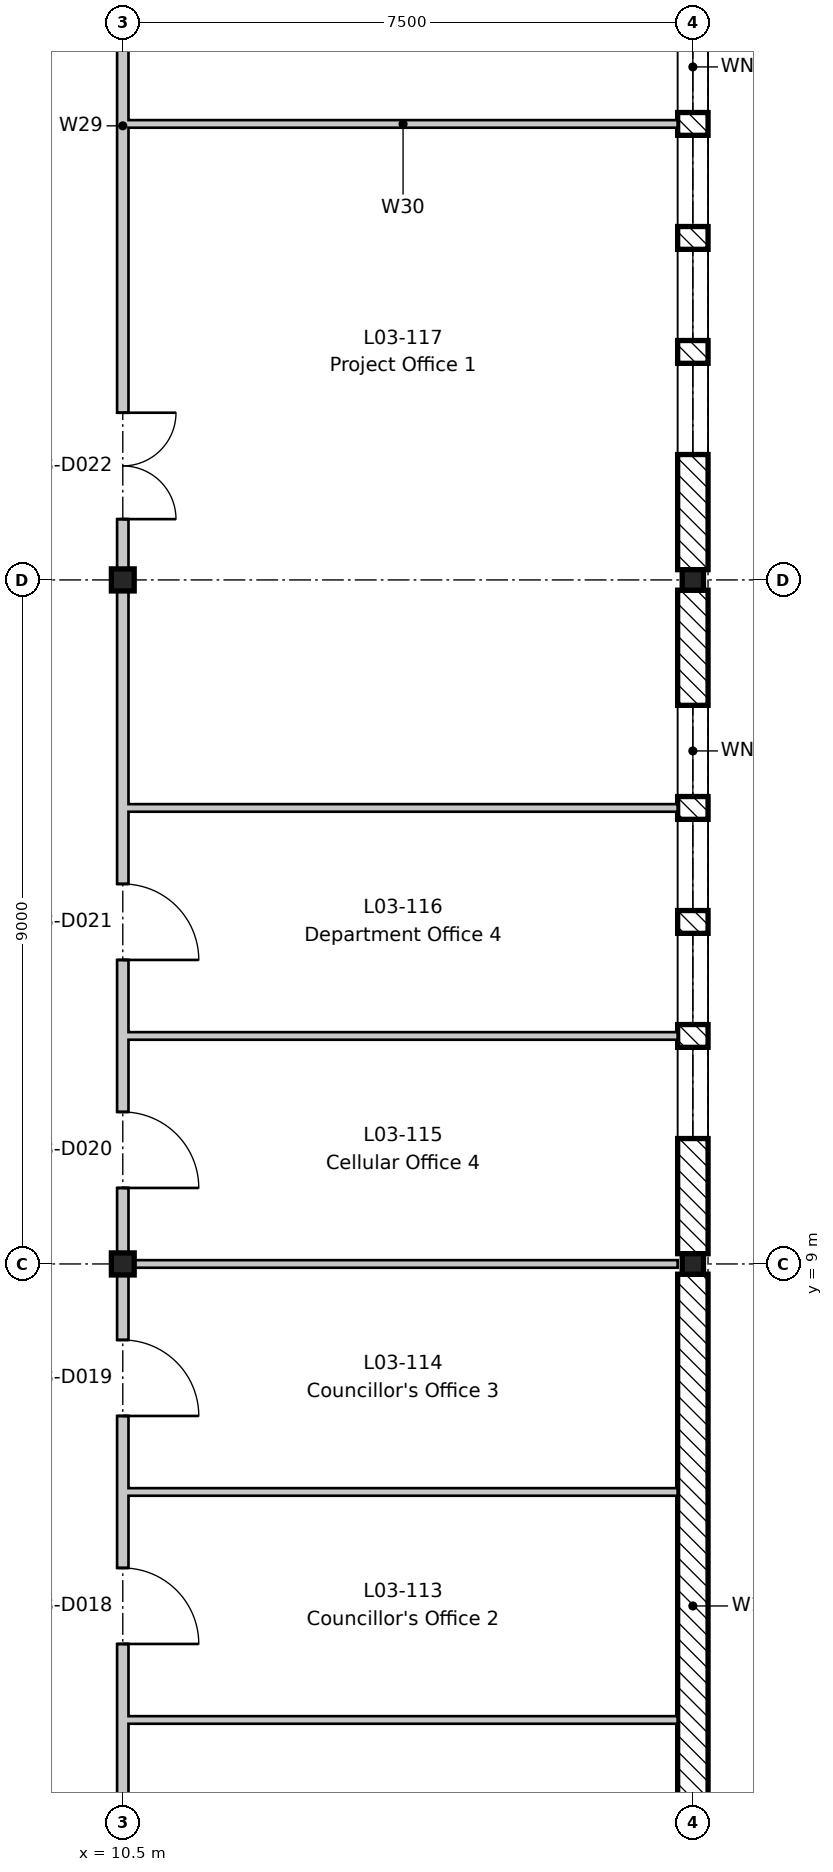
"""IFC4 building model, lengths in metres.
Left out: names, types, materials, properties, quantities, classifications, styles, units other than length and angle.
Written with IfcOpenShell. Run it as: python <this file> out.ifc"""

import sys

from ifc_helpers import new_model, si_unit, direction, frame, frame_2d, origin, origin_2d, place, context, subcontext, project, spatial, rectangle, i_section, extrude, element, fill, save


model = new_model("IFC4")
c1 = context("Model", 3, precision=1e-05, world=origin(), true_north=direction((0.0, 1.0)))
c2 = subcontext(c1, "Body", "Model", "MODEL_VIEW")
j1 = project(units=[si_unit("LENGTHUNIT", "METRE"), si_unit("PLANEANGLEUNIT", "RADIAN")], contexts=[c1])
p1 = place(None, origin())
s1 = spatial("IfcSite", under=j1, at=p1, CompositionType="ELEMENT")
p2 = place(p1, origin())
s2 = spatial("IfcBuilding", under=s1, at=p2, CompositionType="ELEMENT")
p3 = place(p2, frame((0.0, 0.0, 14.4)))
s3 = spatial("IfcBuildingStorey", under=s2, at=p3, CompositionType="ELEMENT", Elevation=14.4)
for number, where, z_axis, x_axis in (
    (1, (10.5, 9.0, -0.2), (0.0, 0.0, 1.0), (1.0, 0.0, 0.0)),
    (2, (10.5, 18.0, -0.2), (0.0, 0.0, 1.0), (1.0, 0.0, 0.0)),
):
    element("IfcColumn", number, at=place(p3, frame(where, z_axis=z_axis, x_axis=x_axis)), inside=s3, PredefinedType="COLUMN", context=c2, shape_type="SweptSolid", body=[
        extrude(i_section(OverallWidth=0.3, OverallDepth=0.29, WebThickness=0.009, FlangeThickness=0.014, FilletRadius=0.027, at=origin_2d()), origin(), (0.0, 0.0, 1.0), 4.2),
    ])
for number, where, z_axis, x_axis in (
    (3, (18.0, 9.0, -0.2), (0.0, 0.0, 1.0), (1.0, 0.0, 0.0)),
    (4, (18.0, 18.0, -0.2), (0.0, 0.0, 1.0), (1.0, 0.0, 0.0)),
):
    element("IfcColumn", number, at=place(p3, frame(where, z_axis=z_axis, x_axis=x_axis)), inside=s3, PredefinedType="COLUMN", context=c2, shape_type="SweptSolid", body=[
        extrude(i_section(OverallWidth=0.28, OverallDepth=0.27, WebThickness=0.008, FlangeThickness=0.013, FilletRadius=0.024, at=origin_2d()), origin(), (0.0, 0.0, 1.0), 4.2),
    ])
p4 = place(p3, frame((18.0, 8.865, 0.0), z_axis=(0.0, 0.0, 1.0), x_axis=(0.0, -1.0, 0.0)))
e5 = element("IfcWall", 5, at=p4, inside=s3, PredefinedType="STANDARD", context=c2, shape_type="SweptSolid", body=[
    extrude(rectangle(XDim=8.73, YDim=0.4, at=frame_2d((4.365, 0.0))), origin(), (0.0, 0.0, 1.0), 3.6),
])
p5 = place(p3, frame((18.0, 17.865, 0.0), z_axis=(0.0, 0.0, 1.0), x_axis=(0.0, -1.0, 0.0)))
e6 = element("IfcWall", 6, at=p5, inside=s3, PredefinedType="STANDARD", context=c2, shape_type="SweptSolid", body=[
    extrude(rectangle(XDim=8.73, YDim=0.4, at=frame_2d((4.365, 0.0))), origin(), (0.0, 0.0, 1.0), 3.6),
])
p6 = place(p5, frame((6.015, 0.0, 0.6)))
e7 = element("IfcOpeningElement", 7, at=p6, cuts=e6, PredefinedType="OPENING", context=c2, shape_type="SweptSolid", body=[
    extrude(rectangle(XDim=1.2, YDim=2.7, at=frame_2d((0.6, 1.35))), frame((0.0, 0.21, 0.0), z_axis=(0.0, -1.0, 0.0), x_axis=(1.0, 0.0, 0.0)), (0.0, 0.0, 1.0), 0.42),
])
p7 = place(p5, frame((4.515, 0.0, 0.6)))
e8 = element("IfcOpeningElement", 8, at=p7, cuts=e6, PredefinedType="OPENING", context=c2, shape_type="SweptSolid", body=[
    extrude(rectangle(XDim=1.2, YDim=2.7, at=frame_2d((0.6, 1.35))), frame((0.0, 0.21, 0.0), z_axis=(0.0, -1.0, 0.0), x_axis=(1.0, 0.0, 0.0)), (0.0, 0.0, 1.0), 0.42),
])
p8 = place(p5, frame((3.015, 0.0, 0.6)))
e9 = element("IfcOpeningElement", 9, at=p8, cuts=e6, PredefinedType="OPENING", context=c2, shape_type="SweptSolid", body=[
    extrude(rectangle(XDim=1.2, YDim=2.7, at=frame_2d((0.6, 1.35))), frame((0.0, 0.21, 0.0), z_axis=(0.0, -1.0, 0.0), x_axis=(1.0, 0.0, 0.0)), (0.0, 0.0, 1.0), 0.42),
])
p9 = place(p5, frame((1.515, 0.0, 0.6)))
e10 = element("IfcOpeningElement", 10, at=p9, cuts=e6, PredefinedType="OPENING", context=c2, shape_type="SweptSolid", body=[
    extrude(rectangle(XDim=1.2, YDim=2.7, at=frame_2d((0.6, 1.35))), frame((0.0, 0.21, 0.0), z_axis=(0.0, -1.0, 0.0), x_axis=(1.0, 0.0, 0.0)), (0.0, 0.0, 1.0), 0.42),
])
p10 = place(p3, frame((18.0, 26.865, 0.0), z_axis=(0.0, 0.0, 1.0), x_axis=(0.0, -1.0, 0.0)))
e11 = element("IfcWall", 11, at=p10, inside=s3, PredefinedType="STANDARD", context=c2, shape_type="SweptSolid", body=[
    extrude(rectangle(XDim=8.73, YDim=0.4, at=frame_2d((4.365, 0.0))), origin(), (0.0, 0.0, 1.0), 3.6),
])
p11 = place(p10, frame((6.015, 0.0, 0.6)))
e12 = element("IfcOpeningElement", 12, at=p11, cuts=e11, PredefinedType="OPENING", context=c2, shape_type="SweptSolid", body=[
    extrude(rectangle(XDim=1.2, YDim=2.7, at=frame_2d((0.6, 1.35))), frame((0.0, 0.21, 0.0), z_axis=(0.0, -1.0, 0.0), x_axis=(1.0, 0.0, 0.0)), (0.0, 0.0, 1.0), 0.42),
])
p12 = place(p10, frame((4.515, 0.0, 0.6)))
e13 = element("IfcOpeningElement", 13, at=p12, cuts=e11, PredefinedType="OPENING", context=c2, shape_type="SweptSolid", body=[
    extrude(rectangle(XDim=1.2, YDim=2.7, at=frame_2d((0.6, 1.35))), frame((0.0, 0.21, 0.0), z_axis=(0.0, -1.0, 0.0), x_axis=(1.0, 0.0, 0.0)), (0.0, 0.0, 1.0), 0.42),
])
p13 = place(p10, frame((3.015, 0.0, 0.6)))
e14 = element("IfcOpeningElement", 14, at=p13, cuts=e11, PredefinedType="OPENING", context=c2, shape_type="SweptSolid", body=[
    extrude(rectangle(XDim=1.2, YDim=2.7, at=frame_2d((0.6, 1.35))), frame((0.0, 0.21, 0.0), z_axis=(0.0, -1.0, 0.0), x_axis=(1.0, 0.0, 0.0)), (0.0, 0.0, 1.0), 0.42),
])
p14 = place(p10, frame((1.515, 0.0, 0.6)))
e15 = element("IfcOpeningElement", 15, at=p14, cuts=e11, PredefinedType="OPENING", context=c2, shape_type="SweptSolid", body=[
    extrude(rectangle(XDim=1.2, YDim=2.7, at=frame_2d((0.6, 1.35))), frame((0.0, 0.21, 0.0), z_axis=(0.0, -1.0, 0.0), x_axis=(1.0, 0.0, 0.0)), (0.0, 0.0, 1.0), 0.42),
])
for number, where, z_axis, x_axis in (
    (16, (10.575, 3.0, 0.0), (0.0, 0.0, 1.0), (1.0, 0.0, 0.0)),
    (17, (10.575, 6.0, 0.0), (0.0, 0.0, 1.0), (1.0, 0.0, 0.0)),
):
    element("IfcWall", number, at=place(p3, frame(where, z_axis=z_axis, x_axis=x_axis)), inside=s3, PredefinedType="PARTITIONING", context=c2, shape_type="SweptSolid", body=[
        extrude(rectangle(XDim=7.225, YDim=0.1, at=frame_2d((3.613, 0.0))), origin(), (0.0, 0.0, 1.0), 4.0),
    ])
p15 = place(p3, frame((10.575, 9.0, 0.0), z_axis=(0.0, 0.0, 1.0), x_axis=(1.0, 0.0, 0.0)))
e18 = element("IfcWall", 18, at=p15, inside=s3, PredefinedType="PARTITIONING", context=c2, shape_type="SweptSolid", body=[
    extrude(rectangle(XDim=7.225, YDim=0.1, at=frame_2d((3.613, 0.0))), origin(), (0.0, 0.0, 1.0), 3.65),
])
for number, where, z_axis, x_axis in (
    (19, (10.575, 12.0, 0.0), (0.0, 0.0, 1.0), (1.0, 0.0, 0.0)),
    (20, (10.575, 15.0, 0.0), (0.0, 0.0, 1.0), (1.0, 0.0, 0.0)),
    (21, (10.575, 24.0, 0.0), (0.0, 0.0, 1.0), (1.0, 0.0, 0.0)),
):
    element("IfcWall", number, at=place(p3, frame(where, z_axis=z_axis, x_axis=x_axis)), inside=s3, PredefinedType="PARTITIONING", context=c2, shape_type="SweptSolid", body=[
        extrude(rectangle(XDim=7.225, YDim=0.1, at=frame_2d((3.613, 0.0))), origin(), (0.0, 0.0, 1.0), 4.0),
    ])
p16 = place(p3, frame((10.5, -8.8, 0.0), z_axis=(0.0, 0.0, 1.0), x_axis=(0.0, 1.0, 0.0)))
e22 = element("IfcWall", 22, at=p16, inside=s3, PredefinedType="PARTITIONING", context=c2, shape_type="SweptSolid", body=[
    extrude(rectangle(XDim=79.3, YDim=0.15, at=frame_2d((39.65, 0.0))), origin(), (0.0, 0.0, 1.0), 3.48),
])
p17 = place(p16, frame((3.6, 0.0, 0.0)))
e23 = element("IfcOpeningElement", 23, at=p17, cuts=e22, PredefinedType="OPENING", context=c2, shape_type="SweptSolid", body=[
    extrude(rectangle(XDim=1.4, YDim=2.1, at=frame_2d((0.7, 1.05))), frame((0.0, 0.085, 0.0), z_axis=(0.0, -1.0, 0.0), x_axis=(1.0, 0.0, 0.0)), (0.0, 0.0, 1.0), 0.17),
])
p18 = place(p16, frame((9.8, 0.0, 0.0)))
e24 = element("IfcOpeningElement", 24, at=p18, cuts=e22, PredefinedType="OPENING", context=c2, shape_type="SweptSolid", body=[
    extrude(rectangle(XDim=1.0, YDim=2.1, at=frame_2d((0.5, 1.05))), frame((0.0, 0.085, 0.0), z_axis=(0.0, -1.0, 0.0), x_axis=(1.0, 0.0, 0.0)), (0.0, 0.0, 1.0), 0.17),
])
p19 = place(p16, frame((12.8, 0.0, 0.0)))
e25 = element("IfcOpeningElement", 25, at=p19, cuts=e22, PredefinedType="OPENING", context=c2, shape_type="SweptSolid", body=[
    extrude(rectangle(XDim=1.0, YDim=2.1, at=frame_2d((0.5, 1.05))), frame((0.0, 0.085, 0.0), z_axis=(0.0, -1.0, 0.0), x_axis=(1.0, 0.0, 0.0)), (0.0, 0.0, 1.0), 0.17),
])
p20 = place(p16, frame((15.8, 0.0, 0.0)))
e26 = element("IfcOpeningElement", 26, at=p20, cuts=e22, PredefinedType="OPENING", context=c2, shape_type="SweptSolid", body=[
    extrude(rectangle(XDim=1.0, YDim=2.1, at=frame_2d((0.5, 1.05))), frame((0.0, 0.085, 0.0), z_axis=(0.0, -1.0, 0.0), x_axis=(1.0, 0.0, 0.0)), (0.0, 0.0, 1.0), 0.17),
])
p21 = place(p16, frame((18.8, 0.0, 0.0)))
e27 = element("IfcOpeningElement", 27, at=p21, cuts=e22, PredefinedType="OPENING", context=c2, shape_type="SweptSolid", body=[
    extrude(rectangle(XDim=1.0, YDim=2.1, at=frame_2d((0.5, 1.05))), frame((0.0, 0.085, 0.0), z_axis=(0.0, -1.0, 0.0), x_axis=(1.0, 0.0, 0.0)), (0.0, 0.0, 1.0), 0.17),
])
p22 = place(p16, frame((21.8, 0.0, 0.0)))
e28 = element("IfcOpeningElement", 28, at=p22, cuts=e22, PredefinedType="OPENING", context=c2, shape_type="SweptSolid", body=[
    extrude(rectangle(XDim=1.0, YDim=2.1, at=frame_2d((0.5, 1.05))), frame((0.0, 0.085, 0.0), z_axis=(0.0, -1.0, 0.0), x_axis=(1.0, 0.0, 0.0)), (0.0, 0.0, 1.0), 0.17),
])
p23 = place(p16, frame((27.6, 0.0, 0.0)))
e29 = element("IfcOpeningElement", 29, at=p23, cuts=e22, PredefinedType="OPENING", context=c2, shape_type="SweptSolid", body=[
    extrude(rectangle(XDim=1.4, YDim=2.1, at=frame_2d((0.7, 1.05))), frame((0.0, 0.085, 0.0), z_axis=(0.0, -1.0, 0.0), x_axis=(1.0, 0.0, 0.0)), (0.0, 0.0, 1.0), 0.17),
])
p24 = place(p16, frame((36.55, 0.0, 0.0)))
e30 = element("IfcOpeningElement", 30, at=p24, cuts=e22, PredefinedType="OPENING", context=c2, shape_type="SweptSolid", body=[
    extrude(rectangle(XDim=1.0, YDim=2.1, at=frame_2d((0.5, 1.05))), frame((0.0, 0.085, 0.0), z_axis=(0.0, -1.0, 0.0), x_axis=(1.0, 0.0, 0.0)), (0.0, 0.0, 1.0), 0.17),
])
p25 = place(p16, frame((39.8, 0.0, 0.0)))
e31 = element("IfcOpeningElement", 31, at=p25, cuts=e22, PredefinedType="OPENING", context=c2, shape_type="SweptSolid", body=[
    extrude(rectangle(XDim=1.0, YDim=2.1, at=frame_2d((0.5, 1.05))), frame((0.0, 0.085, 0.0), z_axis=(0.0, -1.0, 0.0), x_axis=(1.0, 0.0, 0.0)), (0.0, 0.0, 1.0), 0.17),
])
p26 = place(p16, frame((42.8, 0.0, 0.0)))
e32 = element("IfcOpeningElement", 32, at=p26, cuts=e22, PredefinedType="OPENING", context=c2, shape_type="SweptSolid", body=[
    extrude(rectangle(XDim=1.0, YDim=2.1, at=frame_2d((0.5, 1.05))), frame((0.0, 0.085, 0.0), z_axis=(0.0, -1.0, 0.0), x_axis=(1.0, 0.0, 0.0)), (0.0, 0.0, 1.0), 0.17),
])
p27 = place(p16, frame((47.3, 0.0, 0.0)))
e33 = element("IfcOpeningElement", 33, at=p27, cuts=e22, PredefinedType="OPENING", context=c2, shape_type="SweptSolid", body=[
    extrude(rectangle(XDim=1.0, YDim=2.1, at=frame_2d((0.5, 1.05))), frame((0.0, 0.085, 0.0), z_axis=(0.0, -1.0, 0.0), x_axis=(1.0, 0.0, 0.0)), (0.0, 0.0, 1.0), 0.17),
])
p28 = place(p16, frame((51.8, 0.0, 0.0)))
e34 = element("IfcOpeningElement", 34, at=p28, cuts=e22, PredefinedType="OPENING", context=c2, shape_type="SweptSolid", body=[
    extrude(rectangle(XDim=1.0, YDim=2.1, at=frame_2d((0.5, 1.05))), frame((0.0, 0.085, 0.0), z_axis=(0.0, -1.0, 0.0), x_axis=(1.0, 0.0, 0.0)), (0.0, 0.0, 1.0), 0.17),
])
p29 = place(p16, frame((56.3, 0.0, 0.0)))
e35 = element("IfcOpeningElement", 35, at=p29, cuts=e22, PredefinedType="OPENING", context=c2, shape_type="SweptSolid", body=[
    extrude(rectangle(XDim=1.0, YDim=2.1, at=frame_2d((0.5, 1.05))), frame((0.0, 0.085, 0.0), z_axis=(0.0, -1.0, 0.0), x_axis=(1.0, 0.0, 0.0)), (0.0, 0.0, 1.0), 0.17),
])
p30 = place(p16, frame((60.8, 0.0, 0.0)))
e36 = element("IfcOpeningElement", 36, at=p30, cuts=e22, PredefinedType="OPENING", context=c2, shape_type="SweptSolid", body=[
    extrude(rectangle(XDim=1.0, YDim=2.1, at=frame_2d((0.5, 1.05))), frame((0.0, 0.085, 0.0), z_axis=(0.0, -1.0, 0.0), x_axis=(1.0, 0.0, 0.0)), (0.0, 0.0, 1.0), 0.17),
])
p31 = place(p16, frame((63.8, 0.0, 0.0)))
e37 = element("IfcOpeningElement", 37, at=p31, cuts=e22, PredefinedType="OPENING", context=c2, shape_type="SweptSolid", body=[
    extrude(rectangle(XDim=1.0, YDim=2.1, at=frame_2d((0.5, 1.05))), frame((0.0, 0.085, 0.0), z_axis=(0.0, -1.0, 0.0), x_axis=(1.0, 0.0, 0.0)), (0.0, 0.0, 1.0), 0.17),
])
p32 = place(p16, frame((66.8, 0.0, 0.0)))
e38 = element("IfcOpeningElement", 38, at=p32, cuts=e22, PredefinedType="OPENING", context=c2, shape_type="SweptSolid", body=[
    extrude(rectangle(XDim=1.0, YDim=2.1, at=frame_2d((0.5, 1.05))), frame((0.0, 0.085, 0.0), z_axis=(0.0, -1.0, 0.0), x_axis=(1.0, 0.0, 0.0)), (0.0, 0.0, 1.0), 0.17),
])
p33 = place(p16, frame((69.8, 0.0, 0.0)))
e39 = element("IfcOpeningElement", 39, at=p33, cuts=e22, PredefinedType="OPENING", context=c2, shape_type="SweptSolid", body=[
    extrude(rectangle(XDim=1.0, YDim=2.1, at=frame_2d((0.5, 1.05))), frame((0.0, 0.085, 0.0), z_axis=(0.0, -1.0, 0.0), x_axis=(1.0, 0.0, 0.0)), (0.0, 0.0, 1.0), 0.17),
])
p34 = place(p16, frame((72.8, 0.0, 0.0)))
e40 = element("IfcOpeningElement", 40, at=p34, cuts=e22, PredefinedType="OPENING", context=c2, shape_type="SweptSolid", body=[
    extrude(rectangle(XDim=1.0, YDim=2.1, at=frame_2d((0.5, 1.05))), frame((0.0, 0.085, 0.0), z_axis=(0.0, -1.0, 0.0), x_axis=(1.0, 0.0, 0.0)), (0.0, 0.0, 1.0), 0.17),
])
p35 = place(p6, origin())
e41 = element("IfcWindow", 41, at=p35, inside=s3, PartitioningType="SINGLE_PANEL", PredefinedType="WINDOW", context=c2, shape_type="SweptSolid", body=[
    extrude(rectangle(XDim=1.2, YDim=2.7, at=frame_2d((0.6, 1.35))), frame((0.0, 0.03, 0.0), z_axis=(0.0, -1.0, 0.0), x_axis=(1.0, 0.0, 0.0)), (0.0, 0.0, 1.0), 0.06),
])
fill(e7, e41)
p36 = place(p7, origin())
e42 = element("IfcWindow", 42, at=p36, inside=s3, PartitioningType="SINGLE_PANEL", PredefinedType="WINDOW", context=c2, shape_type="SweptSolid", body=[
    extrude(rectangle(XDim=1.2, YDim=2.7, at=frame_2d((0.6, 1.35))), frame((0.0, 0.03, 0.0), z_axis=(0.0, -1.0, 0.0), x_axis=(1.0, 0.0, 0.0)), (0.0, 0.0, 1.0), 0.06),
])
fill(e8, e42)
p37 = place(p8, origin())
e43 = element("IfcWindow", 43, at=p37, inside=s3, PartitioningType="SINGLE_PANEL", PredefinedType="WINDOW", context=c2, shape_type="SweptSolid", body=[
    extrude(rectangle(XDim=1.2, YDim=2.7, at=frame_2d((0.6, 1.35))), frame((0.0, 0.03, 0.0), z_axis=(0.0, -1.0, 0.0), x_axis=(1.0, 0.0, 0.0)), (0.0, 0.0, 1.0), 0.06),
])
fill(e9, e43)
p38 = place(p9, origin())
e44 = element("IfcWindow", 44, at=p38, inside=s3, PartitioningType="SINGLE_PANEL", PredefinedType="WINDOW", context=c2, shape_type="SweptSolid", body=[
    extrude(rectangle(XDim=1.2, YDim=2.7, at=frame_2d((0.6, 1.35))), frame((0.0, 0.03, 0.0), z_axis=(0.0, -1.0, 0.0), x_axis=(1.0, 0.0, 0.0)), (0.0, 0.0, 1.0), 0.06),
])
fill(e10, e44)
p39 = place(p11, origin())
e45 = element("IfcWindow", 45, at=p39, inside=s3, PartitioningType="SINGLE_PANEL", PredefinedType="WINDOW", context=c2, shape_type="SweptSolid", body=[
    extrude(rectangle(XDim=1.2, YDim=2.7, at=frame_2d((0.6, 1.35))), frame((0.0, 0.03, 0.0), z_axis=(0.0, -1.0, 0.0), x_axis=(1.0, 0.0, 0.0)), (0.0, 0.0, 1.0), 0.06),
])
fill(e12, e45)
p40 = place(p12, origin())
e46 = element("IfcWindow", 46, at=p40, inside=s3, PartitioningType="SINGLE_PANEL", PredefinedType="WINDOW", context=c2, shape_type="SweptSolid", body=[
    extrude(rectangle(XDim=1.2, YDim=2.7, at=frame_2d((0.6, 1.35))), frame((0.0, 0.03, 0.0), z_axis=(0.0, -1.0, 0.0), x_axis=(1.0, 0.0, 0.0)), (0.0, 0.0, 1.0), 0.06),
])
fill(e13, e46)
p41 = place(p13, origin())
e47 = element("IfcWindow", 47, at=p41, inside=s3, PartitioningType="SINGLE_PANEL", PredefinedType="WINDOW", context=c2, shape_type="SweptSolid", body=[
    extrude(rectangle(XDim=1.2, YDim=2.7, at=frame_2d((0.6, 1.35))), frame((0.0, 0.03, 0.0), z_axis=(0.0, -1.0, 0.0), x_axis=(1.0, 0.0, 0.0)), (0.0, 0.0, 1.0), 0.06),
])
fill(e14, e47)
p42 = place(p14, origin())
e48 = element("IfcWindow", 48, at=p42, inside=s3, PartitioningType="SINGLE_PANEL", PredefinedType="WINDOW", context=c2, shape_type="SweptSolid", body=[
    extrude(rectangle(XDim=1.2, YDim=2.7, at=frame_2d((0.6, 1.35))), frame((0.0, 0.03, 0.0), z_axis=(0.0, -1.0, 0.0), x_axis=(1.0, 0.0, 0.0)), (0.0, 0.0, 1.0), 0.06),
])
fill(e15, e48)
p43 = place(p19, frame((1.0, 0.0, 0.0), z_axis=(0.0, 0.0, 1.0), x_axis=(-1.0, 0.0, 0.0)))
e49 = element("IfcDoor", 49, at=p43, inside=s3, OperationType="SINGLE_SWING_RIGHT", PredefinedType="DOOR", context=c2, shape_type="SweptSolid", body=[
    extrude(rectangle(XDim=1.0, YDim=2.1, at=frame_2d((0.5, 1.05))), frame((0.0, 0.025, 0.0), z_axis=(0.0, -1.0, 0.0), x_axis=(1.0, 0.0, 0.0)), (0.0, 0.0, 1.0), 0.05),
])
fill(e25, e49)
p44 = place(p20, frame((1.0, 0.0, 0.0), z_axis=(0.0, 0.0, 1.0), x_axis=(-1.0, 0.0, 0.0)))
e50 = element("IfcDoor", 50, at=p44, inside=s3, OperationType="SINGLE_SWING_RIGHT", PredefinedType="DOOR", context=c2, shape_type="SweptSolid", body=[
    extrude(rectangle(XDim=1.0, YDim=2.1, at=frame_2d((0.5, 1.05))), frame((0.0, 0.025, 0.0), z_axis=(0.0, -1.0, 0.0), x_axis=(1.0, 0.0, 0.0)), (0.0, 0.0, 1.0), 0.05),
])
fill(e26, e50)
p45 = place(p21, frame((1.0, 0.0, 0.0), z_axis=(0.0, 0.0, 1.0), x_axis=(-1.0, 0.0, 0.0)))
e51 = element("IfcDoor", 51, at=p45, inside=s3, OperationType="SINGLE_SWING_RIGHT", PredefinedType="DOOR", context=c2, shape_type="SweptSolid", body=[
    extrude(rectangle(XDim=1.0, YDim=2.1, at=frame_2d((0.5, 1.05))), frame((0.0, 0.025, 0.0), z_axis=(0.0, -1.0, 0.0), x_axis=(1.0, 0.0, 0.0)), (0.0, 0.0, 1.0), 0.05),
])
fill(e27, e51)
p46 = place(p22, frame((1.0, 0.0, 0.0), z_axis=(0.0, 0.0, 1.0), x_axis=(-1.0, 0.0, 0.0)))
e52 = element("IfcDoor", 52, at=p46, inside=s3, OperationType="SINGLE_SWING_RIGHT", PredefinedType="DOOR", context=c2, shape_type="SweptSolid", body=[
    extrude(rectangle(XDim=1.0, YDim=2.1, at=frame_2d((0.5, 1.05))), frame((0.0, 0.025, 0.0), z_axis=(0.0, -1.0, 0.0), x_axis=(1.0, 0.0, 0.0)), (0.0, 0.0, 1.0), 0.05),
])
fill(e28, e52)
p47 = place(p23, frame((1.4, 0.0, 0.0), z_axis=(0.0, 0.0, 1.0), x_axis=(-1.0, 0.0, 0.0)))
e53 = element("IfcDoor", 53, at=p47, inside=s3, OperationType="DOUBLE_DOOR_SINGLE_SWING", PredefinedType="DOOR", context=c2, shape_type="SweptSolid", body=[
    extrude(rectangle(XDim=1.4, YDim=2.1, at=frame_2d((0.7, 1.05))), frame((0.0, 0.025, 0.0), z_axis=(0.0, -1.0, 0.0), x_axis=(1.0, 0.0, 0.0)), (0.0, 0.0, 1.0), 0.05),
])
fill(e29, e53)
save(model, sys.argv[1])
